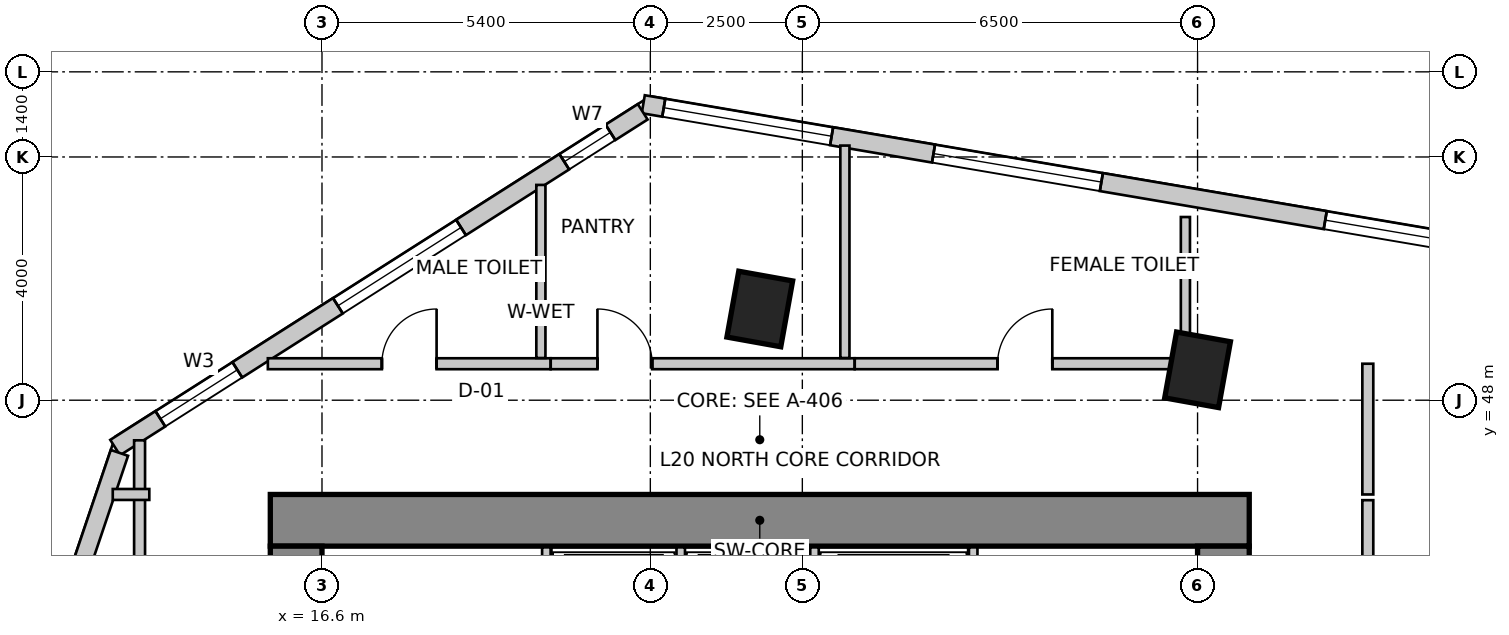
"""IFC4 building model, lengths in metres.
Left out: names, types, materials, properties, quantities, classifications, styles, units other than length and angle.
Written with IfcOpenShell. Run it as: python <this file> out.ifc"""

import sys

from ifc_helpers import new_model, si_unit, direction, frame, frame_2d, origin, origin_2d, place, context, subcontext, project, spatial, rectangle, extrude, source, transform, mapped, element, fill, save


model = new_model("IFC4")
c1 = context("Model", 3, precision=1e-05, world=origin(), true_north=direction((0.0, 1.0)))
c2 = subcontext(c1, "Body", "Model", "MODEL_VIEW")
j1 = project(units=[si_unit("LENGTHUNIT", "METRE"), si_unit("PLANEANGLEUNIT", "RADIAN")], contexts=[c1])
p1 = place(None, origin())
s1 = spatial("IfcSite", under=j1, at=p1, CompositionType="ELEMENT")
p2 = place(p1, origin())
s2 = spatial("IfcBuilding", under=s1, at=p2, CompositionType="ELEMENT")
p3 = place(p2, frame((0.0, 0.0, 83.0)))
s3 = spatial("IfcBuildingStorey", under=s2, at=p3, CompositionType="ELEMENT", Elevation=83.0)
p4 = place(p3, frame((15.75, 46.025, 0.0), z_axis=(0.0, 0.0, 1.0), x_axis=(1.0, 0.0, 0.0)))
e1 = element("IfcWall", 1, at=p4, inside=s3, PredefinedType="SHEAR", context=c2, shape_type="SweptSolid", body=[
    extrude(rectangle(XDim=16.1, YDim=0.85, at=frame_2d((8.05, 0.0))), origin(), (0.0, 0.0, 1.0), 4.0),
])
p5 = place(p3, frame((16.175, 34.2, 0.0), z_axis=(0.0, 0.0, 1.0), x_axis=(0.0, 1.0, 0.0)))
e2 = element("IfcWall", 2, at=p5, inside=s3, PredefinedType="SHEAR", context=c2, shape_type="SweptSolid", body=[
    extrude(rectangle(XDim=11.4, YDim=0.85, at=frame_2d((5.7, 0.0))), origin(), (0.0, 0.0, 1.0), 4.0),
])
m1 = source(origin(), c2, "Body", "SweptSolid", [
    extrude(rectangle(XDim=1.1, YDim=2.15, at=frame_2d((0.55, 1.075))), frame((0.0, 0.435, 0.0), z_axis=(0.0, -1.0, 0.0), x_axis=(1.0, 0.0, 0.0)), (0.0, 0.0, 1.0), 0.87),
])
p6 = place(p5, frame((7.15, 0.0, 0.0)))
e3 = element("IfcOpeningElement", 3, at=p6, cuts=e2, PredefinedType="OPENING", context=c2, shape_type="MappedRepresentation", body=[
    mapped(m1, transform((0.0, 0.0, 0.0), scale=1.0)),
])
p7 = place(p3, frame((31.425, 34.2, 0.0), z_axis=(0.0, 0.0, 1.0), x_axis=(0.0, 1.0, 0.0)))
e4 = element("IfcWall", 4, at=p7, inside=s3, PredefinedType="SHEAR", context=c2, shape_type="SweptSolid", body=[
    extrude(rectangle(XDim=11.4, YDim=0.85, at=frame_2d((5.7, 0.0))), origin(), (0.0, 0.0, 1.0), 4.0),
])
p8 = place(p7, frame((7.35, 0.0, 0.0)))
e5 = element("IfcOpeningElement", 5, at=p8, cuts=e4, PredefinedType="OPENING", context=c2, shape_type="MappedRepresentation", body=[
    mapped(m1, transform((0.0, 0.0, 0.0), scale=1.0)),
])
m2 = source(origin(), c2, "Body", "SweptSolid", [
    extrude(rectangle(XDim=0.9, YDim=1.1, at=origin_2d()), origin(), (0.0, 0.0, 1.0), 4.0),
])
for number, where, z_axis, x_axis in (
    (6, (23.8, 49.5, 0.0), (0.0, 0.0, 1.0), (0.984, -0.177, 0.0)),
    (7, (31.0, 48.5, 0.0), (0.0, 0.0, 1.0), (0.984, -0.177, 0.0)),
):
    element("IfcColumn", number, at=place(p3, frame(where, z_axis=z_axis, x_axis=x_axis)), inside=s3, PredefinedType="COLUMN", context=c2, shape_type="MappedRepresentation", body=[
        mapped(m2, transform((0.0, 0.0, 0.0), scale=1.0)),
    ])
p9 = place(p3, frame((53.961, 47.417, 0.0), z_axis=(0.0, 0.0, 1.0), x_axis=(-0.985865713455, 0.167537443678, 0.0)))
e8 = element("IfcWall", 8, at=p9, inside=s3, PredefinedType="SOLIDWALL", context=c2, shape_type="SweptSolid", body=[
    extrude(rectangle(XDim=32.537, YDim=0.3, at=frame_2d((16.269, 0.0))), origin(), (0.0, 0.0, 1.0), 3.75),
])
m3 = source(origin(), c2, "Body", "SweptSolid", [
    extrude(rectangle(XDim=2.4, YDim=2.2, at=frame_2d((1.2, 1.1))), frame((0.0, 0.16, 0.0), z_axis=(0.0, -1.0, 0.0), x_axis=(1.0, 0.0, 0.0)), (0.0, 0.0, 1.0), 0.32),
])
p10 = place(p9, frame((0.375, 0.0, 0.85)))
e9 = element("IfcOpeningElement", 9, at=p10, cuts=e8, PredefinedType="OPENING", context=c2, shape_type="MappedRepresentation", body=[
    mapped(m3, transform((0.0, 0.0, 0.0), scale=1.0)),
])
m4 = source(origin(), c2, "Body", "SweptSolid", [
    extrude(rectangle(XDim=2.8, YDim=2.4, at=frame_2d((1.4, 1.2))), frame((0.0, 0.16, 0.0), z_axis=(0.0, -1.0, 0.0), x_axis=(1.0, 0.0, 0.0)), (0.0, 0.0, 1.0), 0.32),
])
p11 = place(p9, frame((3.822, 0.0, 0.85)))
e10 = element("IfcOpeningElement", 10, at=p11, cuts=e8, PredefinedType="OPENING", context=c2, shape_type="MappedRepresentation", body=[
    mapped(m4, transform((0.0, 0.0, 0.0), scale=1.0)),
])
p12 = place(p9, frame((8.168, 0.0, 0.85)))
e11 = element("IfcOpeningElement", 11, at=p12, cuts=e8, PredefinedType="OPENING", context=c2, shape_type="MappedRepresentation", body=[
    mapped(m4, transform((0.0, 0.0, 0.0), scale=1.0)),
])
p13 = place(p9, frame((12.513, 0.0, 0.85)))
e12 = element("IfcOpeningElement", 12, at=p13, cuts=e8, PredefinedType="OPENING", context=c2, shape_type="MappedRepresentation", body=[
    mapped(m4, transform((0.0, 0.0, 0.0), scale=1.0)),
])
p14 = place(p9, frame((18.36, 0.0, 0.85)))
e13 = element("IfcOpeningElement", 13, at=p14, cuts=e8, PredefinedType="OPENING", context=c2, shape_type="MappedRepresentation", body=[
    mapped(m4, transform((0.0, 0.0, 0.0), scale=1.0)),
])
p15 = place(p9, frame((24.895, 0.0, 0.85)))
e14 = element("IfcOpeningElement", 14, at=p15, cuts=e8, PredefinedType="OPENING", context=c2, shape_type="MappedRepresentation", body=[
    mapped(m4, transform((0.0, 0.0, 0.0), scale=1.0)),
])
p16 = place(p9, frame((29.395, 0.0, 0.85)))
e15 = element("IfcOpeningElement", 15, at=p16, cuts=e8, PredefinedType="OPENING", context=c2, shape_type="MappedRepresentation", body=[
    mapped(m4, transform((0.0, 0.0, 0.0), scale=1.0)),
])
p17 = place(p3, frame((21.875, 52.742, 0.0), z_axis=(0.0, 0.0, 1.0), x_axis=(-0.843662465249, -0.536873956092, 0.0)))
e16 = element("IfcWall", 16, at=p17, inside=s3, PredefinedType="SOLIDWALL", context=c2, shape_type="SweptSolid", body=[
    extrude(rectangle(XDim=10.284, YDim=0.3, at=frame_2d((5.142, 0.0))), origin(), (0.0, 0.0, 1.0), 3.75),
])
m5 = source(origin(), c2, "Body", "SweptSolid", [
    extrude(rectangle(XDim=0.9, YDim=1.6, at=frame_2d((0.45, 0.8))), frame((0.0, 0.16, 0.0), z_axis=(0.0, -1.0, 0.0), x_axis=(1.0, 0.0, 0.0)), (0.0, 0.0, 1.0), 0.32),
])
p18 = place(p17, frame((0.629, 0.0, 0.85)))
e17 = element("IfcOpeningElement", 17, at=p18, cuts=e16, PredefinedType="OPENING", context=c2, shape_type="MappedRepresentation", body=[
    mapped(m5, transform((0.0, 0.0, 0.0), scale=1.0)),
])
p19 = place(p17, frame((3.542, 0.0, 0.85)))
e18 = element("IfcOpeningElement", 18, at=p19, cuts=e16, PredefinedType="OPENING", context=c2, shape_type="MappedRepresentation", body=[
    mapped(m3, transform((0.0, 0.0, 0.0), scale=1.0)),
])
m6 = source(origin(), c2, "Body", "SweptSolid", [
    extrude(rectangle(XDim=1.5, YDim=1.8, at=frame_2d((0.75, 0.9))), frame((0.0, 0.16, 0.0), z_axis=(0.0, -1.0, 0.0), x_axis=(1.0, 0.0, 0.0)), (0.0, 0.0, 1.0), 0.32),
])
p20 = place(p17, frame((7.903, 0.0, 0.85)))
e19 = element("IfcOpeningElement", 19, at=p20, cuts=e16, PredefinedType="OPENING", context=c2, shape_type="MappedRepresentation", body=[
    mapped(m6, transform((0.0, 0.0, 0.0), scale=1.0)),
])
p21 = place(p3, frame((13.269, 47.134, 0.0), z_axis=(0.0, 0.0, 1.0), x_axis=(-0.319920423265, -0.947444416722, 0.0)))
e20 = element("IfcWall", 20, at=p21, inside=s3, PredefinedType="SOLIDWALL", context=c2, shape_type="SweptSolid", body=[
    extrude(rectangle(XDim=16.135, YDim=0.3, at=frame_2d((8.067, 0.0))), origin(), (0.0, 0.0, 1.0), 3.75),
])
p22 = place(p21, frame((1.988, 0.0, 0.85)))
e21 = element("IfcOpeningElement", 21, at=p22, cuts=e20, PredefinedType="OPENING", context=c2, shape_type="MappedRepresentation", body=[
    mapped(m4, transform((0.0, 0.0, 0.0), scale=1.0)),
])
p23 = place(p21, frame((7.159, 0.0, 0.85)))
e22 = element("IfcOpeningElement", 22, at=p23, cuts=e20, PredefinedType="OPENING", context=c2, shape_type="MappedRepresentation", body=[
    mapped(m3, transform((0.0, 0.0, 0.0), scale=1.0)),
])
p24 = place(p21, frame((11.93, 0.0, 0.85)))
e23 = element("IfcOpeningElement", 23, at=p24, cuts=e20, PredefinedType="OPENING", context=c2, shape_type="MappedRepresentation", body=[
    mapped(m4, transform((0.0, 0.0, 0.0), scale=1.0)),
])
for number, where, z_axis, x_axis in (
    (24, (20.29, 43.28, 0.0), (0.0, 0.0, 1.0), (0.0, 1.0, 0.0)),
    (25, (27.31, 43.28, 0.0), (0.0, 0.0, 1.0), (0.0, 1.0, 0.0)),
):
    element("IfcWall", number, at=place(p3, frame(where, z_axis=z_axis, x_axis=x_axis)), inside=s3, PredefinedType="SOLIDWALL", context=c2, shape_type="SweptSolid", body=[
        extrude(rectangle(XDim=2.3, YDim=0.14, at=frame_2d((1.15, 0.0))), origin(), (0.0, 0.0, 1.0), 3.75),
    ])
for number, where, z_axis, x_axis in (
    (26, (22.5, 43.02, 0.0), (0.0, 0.0, 1.0), (0.0, 1.0, 0.0)),
    (27, (24.7, 43.02, 0.0), (0.0, 0.0, 1.0), (0.0, 1.0, 0.0)),
):
    element("IfcWall", number, at=place(p3, frame(where, z_axis=z_axis, x_axis=x_axis)), inside=s3, PredefinedType="SOLIDWALL", context=c2, shape_type="SweptSolid", body=[
        extrude(rectangle(XDim=2.56, YDim=0.14, at=frame_2d((1.28, 0.0))), origin(), (0.0, 0.0, 1.0), 3.75),
    ])
p25 = place(p3, frame((13.6, 33.444, 0.0), z_axis=(0.0, 0.0, 1.0), x_axis=(0.0, 1.0, 0.0)))
e28 = element("IfcWall", 28, at=p25, inside=s3, PredefinedType="PARTITIONING", context=c2, shape_type="SweptSolid", body=[
    extrude(rectangle(XDim=13.896, YDim=0.18, at=frame_2d((6.948, 0.0))), origin(), (0.0, 0.0, 1.0), 2.892),
])
m7 = source(origin(), c2, "Body", "SweptSolid", [
    extrude(rectangle(XDim=0.9, YDim=2.15, at=frame_2d((0.45, 1.075))), frame((0.0, 0.1, 0.0), z_axis=(0.0, -1.0, 0.0), x_axis=(1.0, 0.0, 0.0)), (0.0, 0.0, 1.0), 0.2),
])
p26 = place(p25, frame((4.144, 0.0, 0.0)))
e29 = element("IfcOpeningElement", 29, at=p26, cuts=e28, PredefinedType="OPENING", context=c2, shape_type="MappedRepresentation", body=[
    mapped(m7, transform((0.0, 0.0, 0.0), scale=1.0)),
])
p27 = place(p3, frame((13.76, 46.45, 0.0), z_axis=(0.0, 0.0, 1.0), x_axis=(-1.0, 0.0, 0.0)))
e30 = element("IfcWall", 30, at=p27, inside=s3, PredefinedType="PARTITIONING", context=c2, shape_type="SweptSolid", body=[
    extrude(rectangle(XDim=0.601, YDim=0.18, at=frame_2d((0.301, 0.0))), origin(), (0.0, 0.0, 1.0), 3.75),
])
p28 = place(p3, frame((15.71, 48.6, 0.0), z_axis=(0.0, 0.0, 1.0), x_axis=(1.0, 0.0, 0.0)))
e31 = element("IfcWall", 31, at=p28, inside=s3, PredefinedType="PARTITIONING", context=c2, shape_type="SweptSolid", body=[
    extrude(rectangle(XDim=4.65, YDim=0.18, at=frame_2d((2.325, 0.0))), origin(), (0.0, 0.0, 1.0), 3.75),
])
p29 = place(p28, frame((1.875, 0.0, 0.0)))
e32 = element("IfcOpeningElement", 32, at=p29, cuts=e31, PredefinedType="OPENING", context=c2, shape_type="MappedRepresentation", body=[
    mapped(m7, transform((0.0, 0.0, 0.0), scale=1.0)),
])
p30 = place(p3, frame((20.362, 48.6, 0.0), z_axis=(0.0, 0.0, 1.0), x_axis=(1.0, 0.0, 0.0)))
e33 = element("IfcWall", 33, at=p30, inside=s3, PredefinedType="PARTITIONING", context=c2, shape_type="SweptSolid", body=[
    extrude(rectangle(XDim=4.998, YDim=0.18, at=frame_2d((2.499, 0.0))), origin(), (0.0, 0.0, 1.0), 3.434),
])
p31 = place(p30, frame((0.768, 0.0, 0.0)))
e34 = element("IfcOpeningElement", 34, at=p31, cuts=e33, PredefinedType="OPENING", context=c2, shape_type="MappedRepresentation", body=[
    mapped(m7, transform((0.0, 0.0, 0.0), scale=1.0)),
])
p32 = place(p3, frame((25.362, 48.6, 0.0), z_axis=(0.0, 0.0, 1.0), x_axis=(1.0, 0.0, 0.0)))
e35 = element("IfcWall", 35, at=p32, inside=s3, PredefinedType="PARTITIONING", context=c2, shape_type="SweptSolid", body=[
    extrude(rectangle(XDim=5.598, YDim=0.18, at=frame_2d((2.799, 0.0))), origin(), (0.0, 0.0, 1.0), 2.892),
])
p33 = place(p32, frame((2.349, 0.0, 0.0)))
e36 = element("IfcOpeningElement", 36, at=p33, cuts=e35, PredefinedType="OPENING", context=c2, shape_type="MappedRepresentation", body=[
    mapped(m7, transform((0.0, 0.0, 0.0), scale=1.0)),
])
p34 = place(p3, frame((33.8, 48.6, 0.0), z_axis=(0.0, 0.0, 1.0), x_axis=(0.0, -1.0, 0.0)))
e37 = element("IfcWall", 37, at=p34, inside=s3, PredefinedType="PARTITIONING", context=c2, shape_type="SweptSolid", body=[
    extrude(rectangle(XDim=2.15, YDim=0.18, at=frame_2d((1.075, 0.0))), origin(), (0.0, 0.0, 1.0), 2.892),
])
p35 = place(p3, frame((33.8, 46.356, 0.0), z_axis=(0.0, 0.0, 1.0), x_axis=(0.0, -1.0, 0.0)))
e38 = element("IfcWall", 38, at=p35, inside=s3, PredefinedType="PARTITIONING", context=c2, shape_type="SweptSolid", body=[
    extrude(rectangle(XDim=8.516, YDim=0.18, at=frame_2d((4.258, 0.0))), origin(), (0.0, 0.0, 1.0), 3.322),
])
p36 = place(p3, frame((20.2, 51.54, 0.0), z_axis=(0.0, 0.0, 1.0), x_axis=(0.0, -1.0, 0.0)))
e39 = element("IfcWall", 39, at=p36, inside=s3, PredefinedType="PARTITIONING", context=c2, shape_type="SweptSolid", body=[
    extrude(rectangle(XDim=2.846, YDim=0.15, at=frame_2d((1.423, 0.0))), origin(), (0.0, 0.0, 1.0), 3.75),
])
p37 = place(p3, frame((25.2, 52.188, 0.0), z_axis=(0.0, 0.0, 1.0), x_axis=(0.0, -1.0, 0.0)))
e40 = element("IfcWall", 40, at=p37, inside=s3, PredefinedType="PARTITIONING", context=c2, shape_type="SweptSolid", body=[
    extrude(rectangle(XDim=3.493, YDim=0.15, at=frame_2d((1.747, 0.0))), origin(), (0.0, 0.0, 1.0), 2.892),
])
p38 = place(p3, frame((30.8, 51.013, 0.0), z_axis=(0.0, 0.0, 1.0), x_axis=(0.0, -1.0, 0.0)))
e41 = element("IfcWall", 41, at=p38, inside=s3, PredefinedType="PARTITIONING", context=c2, shape_type="SweptSolid", body=[
    extrude(rectangle(XDim=2.193, YDim=0.15, at=frame_2d((1.096, 0.0))), origin(), (0.0, 0.0, 1.0), 3.75),
])
m8 = source(origin(), c2, "Body", "SweptSolid", [
    extrude(rectangle(XDim=2.8, YDim=2.4, at=frame_2d((1.4, 1.2))), frame((0.0, -0.015, 0.0), z_axis=(0.0, -1.0, 0.0), x_axis=(1.0, 0.0, 0.0)), (0.0, 0.0, 1.0), 0.06),
])
p39 = place(p14, origin())
e42 = element("IfcWindow", 42, at=p39, inside=s3, PartitioningType="SINGLE_PANEL", PredefinedType="WINDOW", context=c2, shape_type="MappedRepresentation", body=[
    mapped(m8, transform((0.0, 0.0, 0.0), scale=1.0)),
])
fill(e13, e42)
p40 = place(p15, origin())
e43 = element("IfcWindow", 43, at=p40, inside=s3, PartitioningType="SINGLE_PANEL", PredefinedType="WINDOW", context=c2, shape_type="MappedRepresentation", body=[
    mapped(m8, transform((0.0, 0.0, 0.0), scale=1.0)),
])
fill(e14, e43)
p41 = place(p16, origin())
e44 = element("IfcWindow", 44, at=p41, inside=s3, PartitioningType="SINGLE_PANEL", PredefinedType="WINDOW", context=c2, shape_type="MappedRepresentation", body=[
    mapped(m8, transform((0.0, 0.0, 0.0), scale=1.0)),
])
fill(e15, e44)
m9 = source(origin(), c2, "Body", "SweptSolid", [
    extrude(rectangle(XDim=0.9, YDim=1.6, at=frame_2d((0.45, 0.8))), frame((0.0, -0.015, 0.0), z_axis=(0.0, -1.0, 0.0), x_axis=(1.0, 0.0, 0.0)), (0.0, 0.0, 1.0), 0.06),
])
p42 = place(p18, origin())
e45 = element("IfcWindow", 45, at=p42, inside=s3, PartitioningType="SINGLE_PANEL", PredefinedType="WINDOW", context=c2, shape_type="MappedRepresentation", body=[
    mapped(m9, transform((0.0, 0.0, 0.0), scale=1.0)),
])
fill(e17, e45)
m10 = source(origin(), c2, "Body", "SweptSolid", [
    extrude(rectangle(XDim=2.4, YDim=2.2, at=frame_2d((1.2, 1.1))), frame((0.0, -0.015, 0.0), z_axis=(0.0, -1.0, 0.0), x_axis=(1.0, 0.0, 0.0)), (0.0, 0.0, 1.0), 0.06),
])
p43 = place(p19, origin())
e46 = element("IfcWindow", 46, at=p43, inside=s3, PartitioningType="SINGLE_PANEL", PredefinedType="WINDOW", context=c2, shape_type="MappedRepresentation", body=[
    mapped(m10, transform((0.0, 0.0, 0.0), scale=1.0)),
])
fill(e18, e46)
m11 = source(origin(), c2, "Body", "SweptSolid", [
    extrude(rectangle(XDim=1.5, YDim=1.8, at=frame_2d((0.75, 0.9))), frame((0.0, -0.015, 0.0), z_axis=(0.0, -1.0, 0.0), x_axis=(1.0, 0.0, 0.0)), (0.0, 0.0, 1.0), 0.06),
])
p44 = place(p20, origin())
e47 = element("IfcWindow", 47, at=p44, inside=s3, PartitioningType="SINGLE_PANEL", PredefinedType="WINDOW", context=c2, shape_type="MappedRepresentation", body=[
    mapped(m11, transform((0.0, 0.0, 0.0), scale=1.0)),
])
fill(e19, e47)
m12 = source(origin(), c2, "Body", "SweptSolid", [
    extrude(rectangle(XDim=0.9, YDim=2.15, at=frame_2d((0.45, 1.075))), frame((0.0, 0.025, 0.0), z_axis=(0.0, -1.0, 0.0), x_axis=(1.0, 0.0, 0.0)), (0.0, 0.0, 1.0), 0.05),
])
p45 = place(p29, origin())
e48 = element("IfcDoor", 48, at=p45, inside=s3, OperationType="SINGLE_SWING_RIGHT", PredefinedType="DOOR", context=c2, shape_type="MappedRepresentation", body=[
    mapped(m12, transform((0.0, 0.0, 0.0), scale=1.0)),
])
fill(e32, e48)
p46 = place(p31, origin())
e49 = element("IfcDoor", 49, at=p46, inside=s3, OperationType="SINGLE_SWING_LEFT", PredefinedType="DOOR", context=c2, shape_type="MappedRepresentation", body=[
    mapped(m12, transform((0.0, 0.0, 0.0), scale=1.0)),
])
fill(e34, e49)
p47 = place(p33, origin())
e50 = element("IfcDoor", 50, at=p47, inside=s3, OperationType="SINGLE_SWING_RIGHT", PredefinedType="DOOR", context=c2, shape_type="MappedRepresentation", body=[
    mapped(m12, transform((0.0, 0.0, 0.0), scale=1.0)),
])
fill(e36, e50)
save(model, sys.argv[1])
